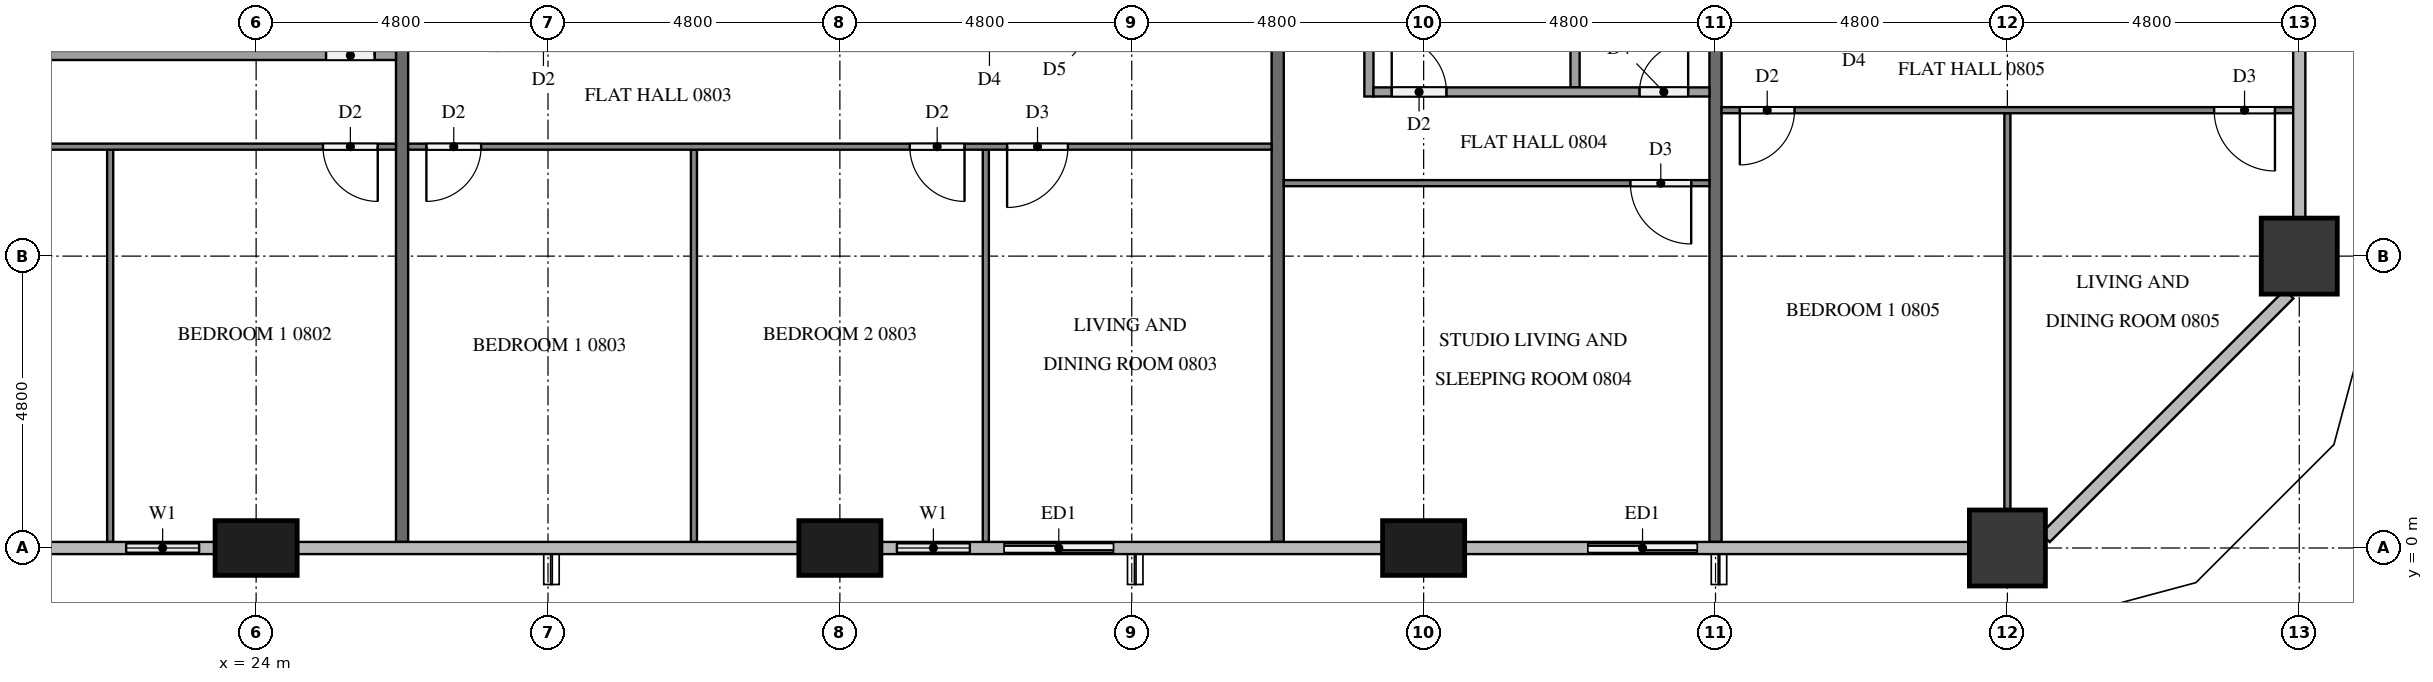
"""IFC4 building model, lengths in metres.
Left out: names, types, materials, properties, quantities, classifications, styles, units other than length and angle.
Written with IfcOpenShell. Run it as: python <this file> out.ifc"""

import sys

from ifc_helpers import new_model, si_unit, direction, frame, frame_2d, origin, origin_2d, place, context, subcontext, project, spatial, rectangle, extrude, element, fill, save


model = new_model("IFC4")
c1 = context("Model", 3, precision=1e-05, world=origin(), true_north=direction((0.0, 1.0)))
c2 = subcontext(c1, "Body", "Model", "MODEL_VIEW")
j1 = project(units=[si_unit("LENGTHUNIT", "METRE"), si_unit("PLANEANGLEUNIT", "RADIAN")], contexts=[c1])
p1 = place(None, origin())
s1 = spatial("IfcSite", under=j1, at=p1, CompositionType="ELEMENT")
p2 = place(p1, origin())
s2 = spatial("IfcBuilding", under=s1, at=p2, CompositionType="ELEMENT")
p3 = place(p2, frame((0.0, 0.0, 36.4)))
s3 = spatial("IfcBuildingStorey", under=s2, at=p3, CompositionType="ELEMENT", Elevation=36.4)
for number, where, z_axis, x_axis in (
    (1, (24.0, 0.0, 0.0), (0.0, 0.0, 1.0), (1.0, 0.0, 0.0)),
    (2, (33.6, 0.0, 0.0), (0.0, 0.0, 1.0), (1.0, 0.0, 0.0)),
    (3, (43.2, 0.0, 0.0), (0.0, 0.0, 1.0), (1.0, 0.0, 0.0)),
):
    element("IfcColumn", number, at=place(p3, frame(where, z_axis=z_axis, x_axis=x_axis)), inside=s3, PredefinedType="COLUMN", context=c2, shape_type="SweptSolid", body=[
        extrude(rectangle(XDim=1.35, YDim=0.9, at=origin_2d()), origin(), (0.0, 0.0, 1.0), 3.2),
    ])
for number, where, z_axis, x_axis in (
    (4, (52.8, 0.0, 0.0), (0.0, 0.0, 1.0), (1.0, 0.0, 0.0)),
    (5, (57.6, 4.8, 0.0), (0.0, 0.0, 1.0), (1.0, 0.0, 0.0)),
):
    element("IfcColumn", number, at=place(p3, frame(where, z_axis=z_axis, x_axis=x_axis)), inside=s3, PredefinedType="COLUMN", context=c2, shape_type="SweptSolid", body=[
        extrude(rectangle(XDim=1.25, YDim=1.25, at=origin_2d()), origin(), (0.0, 0.0, 1.0), 3.2),
    ])
p4 = place(p3, frame((21.6, 0.0, 0.0), z_axis=(0.0, 0.0, 1.0), x_axis=(1.0, 0.0, 0.0)))
e6 = element("IfcWall", 6, at=p4, inside=s3, PredefinedType="SOLIDWALL", context=c2, shape_type="SweptSolid", body=[
    extrude(rectangle(XDim=1.725, YDim=0.15, at=frame_2d((0.862, 0.0))), origin(), (0.0, 0.0, 1.0), 3.2),
])
p5 = place(p4, frame((0.262, 0.0, 0.9)))
e7 = element("IfcOpeningElement", 7, at=p5, cuts=e6, PredefinedType="OPENING", context=c2, shape_type="SweptSolid", body=[
    extrude(rectangle(XDim=1.2, YDim=1.4, at=frame_2d((0.6, 0.7))), frame((0.0, 0.085, 0.0), z_axis=(0.0, -1.0, 0.0), x_axis=(1.0, 0.0, 0.0)), (0.0, 0.0, 1.0), 0.17),
])
p6 = place(p3, frame((34.275, 0.0, 0.0), z_axis=(0.0, 0.0, 1.0), x_axis=(1.0, 0.0, 0.0)))
e8 = element("IfcWall", 8, at=p6, inside=s3, PredefinedType="SOLIDWALL", context=c2, shape_type="SweptSolid", body=[
    extrude(rectangle(XDim=4.125, YDim=0.15, at=frame_2d((2.062, 0.0))), origin(), (0.0, 0.0, 1.0), 3.2),
])
p7 = place(p6, frame((0.262, 0.0, 0.9)))
e9 = element("IfcOpeningElement", 9, at=p7, cuts=e8, PredefinedType="OPENING", context=c2, shape_type="SweptSolid", body=[
    extrude(rectangle(XDim=1.2, YDim=1.4, at=frame_2d((0.6, 0.7))), frame((0.0, 0.085, 0.0), z_axis=(0.0, -1.0, 0.0), x_axis=(1.0, 0.0, 0.0)), (0.0, 0.0, 1.0), 0.17),
])
p8 = place(p6, frame((2.025, 0.0, 0.0)))
e10 = element("IfcOpeningElement", 10, at=p8, cuts=e8, PredefinedType="OPENING", context=c2, shape_type="SweptSolid", body=[
    extrude(rectangle(XDim=1.8, YDim=2.4, at=frame_2d((0.9, 1.2))), frame((0.0, 0.085, 0.0), z_axis=(0.0, -1.0, 0.0), x_axis=(1.0, 0.0, 0.0)), (0.0, 0.0, 1.0), 0.17),
])
p9 = place(p3, frame((45.6, 0.0, 0.0), z_axis=(0.0, 0.0, 1.0), x_axis=(1.0, 0.0, 0.0)))
e11 = element("IfcWall", 11, at=p9, inside=s3, PredefinedType="SOLIDWALL", context=c2, shape_type="SweptSolid", body=[
    extrude(rectangle(XDim=2.4, YDim=0.15, at=frame_2d((1.2, 0.0))), origin(), (0.0, 0.0, 1.0), 3.2),
])
p10 = place(p9, frame((0.3, 0.0, 0.0)))
e12 = element("IfcOpeningElement", 12, at=p10, cuts=e11, PredefinedType="OPENING", context=c2, shape_type="SweptSolid", body=[
    extrude(rectangle(XDim=1.8, YDim=2.4, at=frame_2d((0.9, 1.2))), frame((0.0, 0.085, 0.0), z_axis=(0.0, -1.0, 0.0), x_axis=(1.0, 0.0, 0.0)), (0.0, 0.0, 1.0), 0.17),
])
for number, where, z_axis, x_axis in (
    (13, (26.4, 11.9, 0.0), (0.0, 0.0, 1.0), (0.0, -1.0, 0.0)),
    (14, (40.8, 11.9, 0.0), (0.0, 0.0, 1.0), (0.0, -1.0, 0.0)),
    (15, (48.0, 11.9, 0.0), (0.0, 0.0, 1.0), (0.0, -1.0, 0.0)),
):
    element("IfcWall", number, at=place(p3, frame(where, z_axis=z_axis, x_axis=x_axis)), inside=s3, PredefinedType="PARTITIONING", context=c2, shape_type="SweptSolid", body=[
        extrude(rectangle(XDim=11.8, YDim=0.2, at=frame_2d((5.9, 0.0))), origin(), (0.0, 0.0, 1.0), 3.2),
    ])
p11 = place(p3, frame((21.6, 6.55, 0.0), z_axis=(0.0, 0.0, 1.0), x_axis=(0.0, -1.0, 0.0)))
e16 = element("IfcWall", 16, at=p11, inside=s3, PredefinedType="PARTITIONING", context=c2, shape_type="SweptSolid", body=[
    extrude(rectangle(XDim=6.45, YDim=0.1, at=frame_2d((3.225, 0.0))), origin(), (0.0, 0.0, 1.0), 3.2),
])
p12 = place(p3, frame((26.3, 6.6, 0.0), z_axis=(0.0, 0.0, 1.0), x_axis=(-1.0, 0.0, 0.0)))
e17 = element("IfcWall", 17, at=p12, inside=s3, PredefinedType="PARTITIONING", context=c2, shape_type="SweptSolid", body=[
    extrude(rectangle(XDim=11.8, YDim=0.1, at=frame_2d((5.9, 0.0))), origin(), (0.0, 0.0, 1.0), 3.2),
])
p13 = place(p12, frame((10.5, 0.0, 0.0)))
e18 = element("IfcOpeningElement", 18, at=p13, cuts=e17, PredefinedType="OPENING", context=c2, shape_type="SweptSolid", body=[
    extrude(rectangle(XDim=1.0, YDim=2.1, at=frame_2d((0.5, 1.05))), frame((0.0, 0.06, 0.0), z_axis=(0.0, -1.0, 0.0), x_axis=(1.0, 0.0, 0.0)), (0.0, 0.0, 1.0), 0.12),
])
p14 = place(p12, frame((0.3, 0.0, 0.0)))
e19 = element("IfcOpeningElement", 19, at=p14, cuts=e17, PredefinedType="OPENING", context=c2, shape_type="SweptSolid", body=[
    extrude(rectangle(XDim=0.9, YDim=2.1, at=frame_2d((0.45, 1.05))), frame((0.0, 0.06, 0.0), z_axis=(0.0, -1.0, 0.0), x_axis=(1.0, 0.0, 0.0)), (0.0, 0.0, 1.0), 0.12),
])
p15 = place(p3, frame((15.975, 8.1, 0.0), z_axis=(0.0, 0.0, 1.0), x_axis=(1.0, 0.0, 0.0)))
e20 = element("IfcWall", 20, at=p15, inside=s3, PredefinedType="PARTITIONING", context=c2, shape_type="SweptSolid", body=[
    extrude(rectangle(XDim=10.325, YDim=0.15, at=frame_2d((5.163, 0.0))), origin(), (0.0, 0.0, 1.0), 3.2),
])
p16 = place(p15, frame((0.3, 0.0, 0.0)))
e21 = element("IfcOpeningElement", 21, at=p16, cuts=e20, PredefinedType="OPENING", context=c2, shape_type="SweptSolid", body=[
    extrude(rectangle(XDim=0.9, YDim=2.1, at=frame_2d((0.45, 1.05))), frame((0.0, 0.085, 0.0), z_axis=(0.0, -1.0, 0.0), x_axis=(1.0, 0.0, 0.0)), (0.0, 0.0, 1.0), 0.17),
])
p17 = place(p15, frame((9.175, 0.0, 0.0)))
e22 = element("IfcOpeningElement", 22, at=p17, cuts=e20, PredefinedType="OPENING", context=c2, shape_type="SweptSolid", body=[
    extrude(rectangle(XDim=0.8, YDim=2.1, at=frame_2d((0.4, 1.05))), frame((0.0, 0.085, 0.0), z_axis=(0.0, -1.0, 0.0), x_axis=(1.0, 0.0, 0.0)), (0.0, 0.0, 1.0), 0.17),
])
for number, where, z_axis, x_axis in (
    (23, (31.2, 6.55, 0.0), (0.0, 0.0, 1.0), (0.0, -1.0, 0.0)),
    (24, (36.0, 6.55, 0.0), (0.0, 0.0, 1.0), (0.0, -1.0, 0.0)),
):
    element("IfcWall", number, at=place(p3, frame(where, z_axis=z_axis, x_axis=x_axis)), inside=s3, PredefinedType="PARTITIONING", context=c2, shape_type="SweptSolid", body=[
        extrude(rectangle(XDim=6.45, YDim=0.1, at=frame_2d((3.225, 0.0))), origin(), (0.0, 0.0, 1.0), 3.2),
    ])
p18 = place(p3, frame((40.7, 6.6, 0.0), z_axis=(0.0, 0.0, 1.0), x_axis=(-1.0, 0.0, 0.0)))
e25 = element("IfcWall", 25, at=p18, inside=s3, PredefinedType="PARTITIONING", context=c2, shape_type="SweptSolid", body=[
    extrude(rectangle(XDim=14.2, YDim=0.1, at=frame_2d((7.1, 0.0))), origin(), (0.0, 0.0, 1.0), 3.2),
])
p19 = place(p18, frame((13.0, 0.0, 0.0)))
e26 = element("IfcOpeningElement", 26, at=p19, cuts=e25, PredefinedType="OPENING", context=c2, shape_type="SweptSolid", body=[
    extrude(rectangle(XDim=0.9, YDim=2.1, at=frame_2d((0.45, 1.05))), frame((0.0, 0.06, 0.0), z_axis=(0.0, -1.0, 0.0), x_axis=(1.0, 0.0, 0.0)), (0.0, 0.0, 1.0), 0.12),
])
p20 = place(p18, frame((5.05, 0.0, 0.0)))
e27 = element("IfcOpeningElement", 27, at=p20, cuts=e25, PredefinedType="OPENING", context=c2, shape_type="SweptSolid", body=[
    extrude(rectangle(XDim=0.9, YDim=2.1, at=frame_2d((0.45, 1.05))), frame((0.0, 0.06, 0.0), z_axis=(0.0, -1.0, 0.0), x_axis=(1.0, 0.0, 0.0)), (0.0, 0.0, 1.0), 0.12),
])
p21 = place(p18, frame((3.35, 0.0, 0.0)))
e28 = element("IfcOpeningElement", 28, at=p21, cuts=e25, PredefinedType="OPENING", context=c2, shape_type="SweptSolid", body=[
    extrude(rectangle(XDim=1.0, YDim=2.1, at=frame_2d((0.5, 1.05))), frame((0.0, 0.06, 0.0), z_axis=(0.0, -1.0, 0.0), x_axis=(1.0, 0.0, 0.0)), (0.0, 0.0, 1.0), 0.12),
])
p22 = place(p3, frame((47.9, 6.0, 0.0), z_axis=(0.0, 0.0, 1.0), x_axis=(-1.0, 0.0, 0.0)))
e29 = element("IfcWall", 29, at=p22, inside=s3, PredefinedType="PARTITIONING", context=c2, shape_type="SweptSolid", body=[
    extrude(rectangle(XDim=7.0, YDim=0.1, at=frame_2d((3.5, 0.0))), origin(), (0.0, 0.0, 1.0), 3.2),
])
p23 = place(p22, frame((0.3, 0.0, 0.0)))
e30 = element("IfcOpeningElement", 30, at=p23, cuts=e29, PredefinedType="OPENING", context=c2, shape_type="SweptSolid", body=[
    extrude(rectangle(XDim=1.0, YDim=2.1, at=frame_2d((0.5, 1.05))), frame((0.0, 0.06, 0.0), z_axis=(0.0, -1.0, 0.0), x_axis=(1.0, 0.0, 0.0)), (0.0, 0.0, 1.0), 0.12),
])
p24 = place(p3, frame((45.69, 11.9, 0.0), z_axis=(0.0, 0.0, 1.0), x_axis=(0.0, -1.0, 0.0)))
e31 = element("IfcWall", 31, at=p24, inside=s3, PredefinedType="PARTITIONING", context=c2, shape_type="SweptSolid", body=[
    extrude(rectangle(XDim=4.325, YDim=0.15, at=frame_2d((2.163, 0.0))), origin(), (0.0, 0.0, 1.0), 3.2),
])
p25 = place(p3, frame((42.3, 11.9, 0.0), z_axis=(0.0, 0.0, 1.0), x_axis=(0.0, -1.0, 0.0)))
e32 = element("IfcWall", 32, at=p25, inside=s3, PredefinedType="PARTITIONING", context=c2, shape_type="SweptSolid", body=[
    extrude(rectangle(XDim=4.475, YDim=0.15, at=frame_2d((2.237, 0.0))), origin(), (0.0, 0.0, 1.0), 3.2),
])
p26 = place(p3, frame((42.375, 7.5, 0.0), z_axis=(0.0, 0.0, 1.0), x_axis=(1.0, 0.0, 0.0)))
e33 = element("IfcWall", 33, at=p26, inside=s3, PredefinedType="PARTITIONING", context=c2, shape_type="SweptSolid", body=[
    extrude(rectangle(XDim=5.525, YDim=0.15, at=frame_2d((2.762, 0.0))), origin(), (0.0, 0.0, 1.0), 3.2),
])
p27 = place(p26, frame((0.3, 0.0, 0.0)))
e34 = element("IfcOpeningElement", 34, at=p27, cuts=e33, PredefinedType="OPENING", context=c2, shape_type="SweptSolid", body=[
    extrude(rectangle(XDim=0.9, YDim=2.1, at=frame_2d((0.45, 1.05))), frame((0.0, 0.085, 0.0), z_axis=(0.0, -1.0, 0.0), x_axis=(1.0, 0.0, 0.0)), (0.0, 0.0, 1.0), 0.17),
])
p28 = place(p26, frame((4.375, 0.0, 0.0)))
e35 = element("IfcOpeningElement", 35, at=p28, cuts=e33, PredefinedType="OPENING", context=c2, shape_type="SweptSolid", body=[
    extrude(rectangle(XDim=0.8, YDim=2.1, at=frame_2d((0.4, 1.05))), frame((0.0, 0.085, 0.0), z_axis=(0.0, -1.0, 0.0), x_axis=(1.0, 0.0, 0.0)), (0.0, 0.0, 1.0), 0.17),
])
p29 = place(p3, frame((52.8, 7.15, 0.0), z_axis=(0.0, 0.0, 1.0), x_axis=(0.0, -1.0, 0.0)))
e36 = element("IfcWall", 36, at=p29, inside=s3, PredefinedType="PARTITIONING", context=c2, shape_type="SweptSolid", body=[
    extrude(rectangle(XDim=6.525, YDim=0.1, at=frame_2d((3.262, 0.0))), origin(), (0.0, 0.0, 1.0), 3.2),
])
p30 = place(p3, frame((57.5, 7.2, 0.0), z_axis=(0.0, 0.0, 1.0), x_axis=(-1.0, 0.0, 0.0)))
e37 = element("IfcWall", 37, at=p30, inside=s3, PredefinedType="PARTITIONING", context=c2, shape_type="SweptSolid", body=[
    extrude(rectangle(XDim=9.4, YDim=0.1, at=frame_2d((4.7, 0.0))), origin(), (0.0, 0.0, 1.0), 3.2),
])
p31 = place(p30, frame((8.2, 0.0, 0.0)))
e38 = element("IfcOpeningElement", 38, at=p31, cuts=e37, PredefinedType="OPENING", context=c2, shape_type="SweptSolid", body=[
    extrude(rectangle(XDim=0.9, YDim=2.1, at=frame_2d((0.45, 1.05))), frame((0.0, 0.06, 0.0), z_axis=(0.0, -1.0, 0.0), x_axis=(1.0, 0.0, 0.0)), (0.0, 0.0, 1.0), 0.12),
])
p32 = place(p30, frame((0.3, 0.0, 0.0)))
e39 = element("IfcOpeningElement", 39, at=p32, cuts=e37, PredefinedType="OPENING", context=c2, shape_type="SweptSolid", body=[
    extrude(rectangle(XDim=1.0, YDim=2.1, at=frame_2d((0.5, 1.05))), frame((0.0, 0.06, 0.0), z_axis=(0.0, -1.0, 0.0), x_axis=(1.0, 0.0, 0.0)), (0.0, 0.0, 1.0), 0.12),
])
p33 = place(p5, origin())
e40 = element("IfcWindow", 40, at=p33, inside=s3, PartitioningType="SINGLE_PANEL", PredefinedType="WINDOW", context=c2, shape_type="SweptSolid", body=[
    extrude(rectangle(XDim=1.2, YDim=1.4, at=frame_2d((0.6, 0.7))), frame((0.0, 0.03, 0.0), z_axis=(0.0, -1.0, 0.0), x_axis=(1.0, 0.0, 0.0)), (0.0, 0.0, 1.0), 0.06),
])
fill(e7, e40)
p34 = place(p7, origin())
e41 = element("IfcWindow", 41, at=p34, inside=s3, PartitioningType="SINGLE_PANEL", PredefinedType="WINDOW", context=c2, shape_type="SweptSolid", body=[
    extrude(rectangle(XDim=1.2, YDim=1.4, at=frame_2d((0.6, 0.7))), frame((0.0, 0.03, 0.0), z_axis=(0.0, -1.0, 0.0), x_axis=(1.0, 0.0, 0.0)), (0.0, 0.0, 1.0), 0.06),
])
fill(e9, e41)
p35 = place(p8, origin())
e42 = element("IfcDoor", 42, at=p35, inside=s3, OperationType="SLIDING_TO_RIGHT", PredefinedType="DOOR", context=c2, shape_type="SweptSolid", body=[
    extrude(rectangle(XDim=1.8, YDim=2.4, at=frame_2d((0.9, 1.2))), frame((0.0, 0.025, 0.0), z_axis=(0.0, -1.0, 0.0), x_axis=(1.0, 0.0, 0.0)), (0.0, 0.0, 1.0), 0.05),
])
fill(e10, e42)
p36 = place(p10, origin())
e43 = element("IfcDoor", 43, at=p36, inside=s3, OperationType="SLIDING_TO_LEFT", PredefinedType="DOOR", context=c2, shape_type="SweptSolid", body=[
    extrude(rectangle(XDim=1.8, YDim=2.4, at=frame_2d((0.9, 1.2))), frame((0.0, 0.025, 0.0), z_axis=(0.0, -1.0, 0.0), x_axis=(1.0, 0.0, 0.0)), (0.0, 0.0, 1.0), 0.05),
])
fill(e12, e43)
p37 = place(p14, origin())
e44 = element("IfcDoor", 44, at=p37, inside=s3, OperationType="SINGLE_SWING_LEFT", PredefinedType="DOOR", context=c2, shape_type="SweptSolid", body=[
    extrude(rectangle(XDim=0.9, YDim=2.1, at=frame_2d((0.45, 1.05))), frame((0.0, 0.025, 0.0), z_axis=(0.0, -1.0, 0.0), x_axis=(1.0, 0.0, 0.0)), (0.0, 0.0, 1.0), 0.05),
])
fill(e19, e44)
p38 = place(p17, origin())
e45 = element("IfcDoor", 45, at=p38, inside=s3, OperationType="SINGLE_SWING_RIGHT", PredefinedType="DOOR", context=c2, shape_type="SweptSolid", body=[
    extrude(rectangle(XDim=0.8, YDim=2.1, at=frame_2d((0.4, 1.05))), frame((0.0, 0.025, 0.0), z_axis=(0.0, -1.0, 0.0), x_axis=(1.0, 0.0, 0.0)), (0.0, 0.0, 1.0), 0.05),
])
fill(e22, e45)
p39 = place(p19, origin())
e46 = element("IfcDoor", 46, at=p39, inside=s3, OperationType="SINGLE_SWING_RIGHT", PredefinedType="DOOR", context=c2, shape_type="SweptSolid", body=[
    extrude(rectangle(XDim=0.9, YDim=2.1, at=frame_2d((0.45, 1.05))), frame((0.0, 0.025, 0.0), z_axis=(0.0, -1.0, 0.0), x_axis=(1.0, 0.0, 0.0)), (0.0, 0.0, 1.0), 0.05),
])
fill(e26, e46)
p40 = place(p20, origin())
e47 = element("IfcDoor", 47, at=p40, inside=s3, OperationType="SINGLE_SWING_LEFT", PredefinedType="DOOR", context=c2, shape_type="SweptSolid", body=[
    extrude(rectangle(XDim=0.9, YDim=2.1, at=frame_2d((0.45, 1.05))), frame((0.0, 0.025, 0.0), z_axis=(0.0, -1.0, 0.0), x_axis=(1.0, 0.0, 0.0)), (0.0, 0.0, 1.0), 0.05),
])
fill(e27, e47)
p41 = place(p21, origin())
e48 = element("IfcDoor", 48, at=p41, inside=s3, OperationType="SINGLE_SWING_RIGHT", PredefinedType="DOOR", context=c2, shape_type="SweptSolid", body=[
    extrude(rectangle(XDim=1.0, YDim=2.1, at=frame_2d((0.5, 1.05))), frame((0.0, 0.025, 0.0), z_axis=(0.0, -1.0, 0.0), x_axis=(1.0, 0.0, 0.0)), (0.0, 0.0, 1.0), 0.05),
])
fill(e28, e48)
p42 = place(p23, origin())
e49 = element("IfcDoor", 49, at=p42, inside=s3, OperationType="SINGLE_SWING_LEFT", PredefinedType="DOOR", context=c2, shape_type="SweptSolid", body=[
    extrude(rectangle(XDim=1.0, YDim=2.1, at=frame_2d((0.5, 1.05))), frame((0.0, 0.025, 0.0), z_axis=(0.0, -1.0, 0.0), x_axis=(1.0, 0.0, 0.0)), (0.0, 0.0, 1.0), 0.05),
])
fill(e30, e49)
p43 = place(p27, origin())
e50 = element("IfcDoor", 50, at=p43, inside=s3, OperationType="SINGLE_SWING_LEFT", PredefinedType="DOOR", context=c2, shape_type="SweptSolid", body=[
    extrude(rectangle(XDim=0.9, YDim=2.1, at=frame_2d((0.45, 1.05))), frame((0.0, 0.025, 0.0), z_axis=(0.0, -1.0, 0.0), x_axis=(1.0, 0.0, 0.0)), (0.0, 0.0, 1.0), 0.05),
])
fill(e34, e50)
p44 = place(p28, origin())
e51 = element("IfcDoor", 51, at=p44, inside=s3, OperationType="SINGLE_SWING_RIGHT", PredefinedType="DOOR", context=c2, shape_type="SweptSolid", body=[
    extrude(rectangle(XDim=0.8, YDim=2.1, at=frame_2d((0.4, 1.05))), frame((0.0, 0.025, 0.0), z_axis=(0.0, -1.0, 0.0), x_axis=(1.0, 0.0, 0.0)), (0.0, 0.0, 1.0), 0.05),
])
fill(e35, e51)
p45 = place(p31, origin())
e52 = element("IfcDoor", 52, at=p45, inside=s3, OperationType="SINGLE_SWING_RIGHT", PredefinedType="DOOR", context=c2, shape_type="SweptSolid", body=[
    extrude(rectangle(XDim=0.9, YDim=2.1, at=frame_2d((0.45, 1.05))), frame((0.0, 0.025, 0.0), z_axis=(0.0, -1.0, 0.0), x_axis=(1.0, 0.0, 0.0)), (0.0, 0.0, 1.0), 0.05),
])
fill(e38, e52)
p46 = place(p32, origin())
e53 = element("IfcDoor", 53, at=p46, inside=s3, OperationType="SINGLE_SWING_LEFT", PredefinedType="DOOR", context=c2, shape_type="SweptSolid", body=[
    extrude(rectangle(XDim=1.0, YDim=2.1, at=frame_2d((0.5, 1.05))), frame((0.0, 0.025, 0.0), z_axis=(0.0, -1.0, 0.0), x_axis=(1.0, 0.0, 0.0)), (0.0, 0.0, 1.0), 0.05),
])
fill(e39, e53)
save(model, sys.argv[1])
